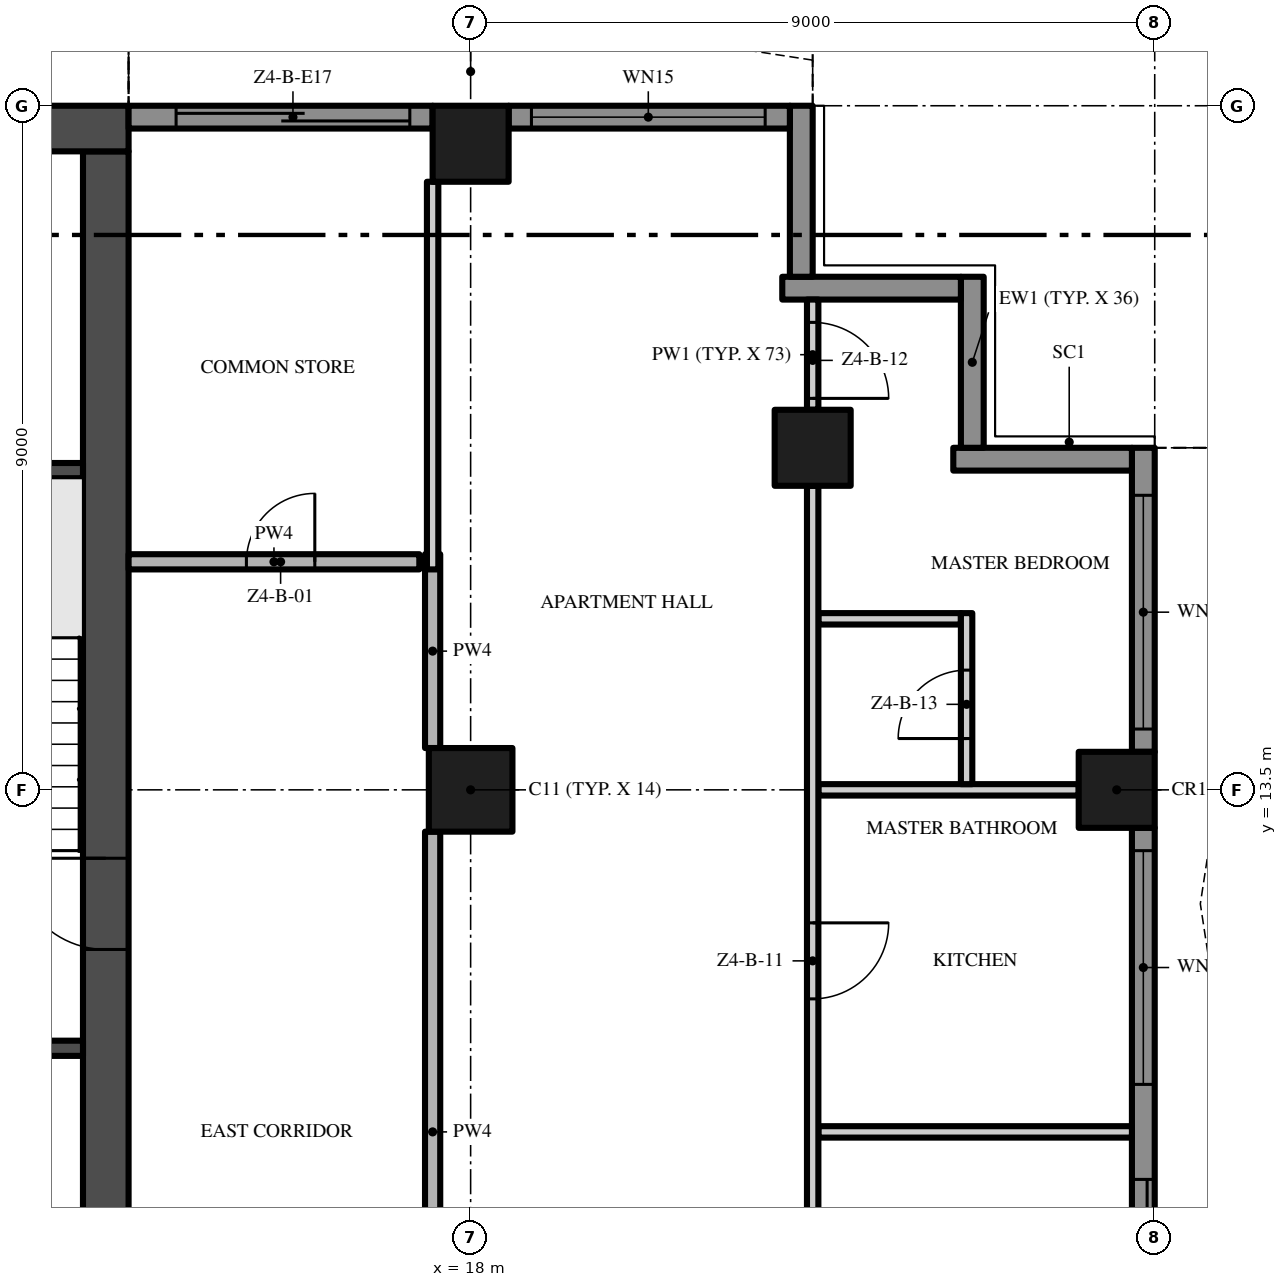
"""IFC4 building model, lengths in metres.
Left out: names, types, materials, properties, quantities, classifications, styles, units other than length and angle.
Written with IfcOpenShell. Run it as: python <this file> out.ifc"""

import sys

from ifc_helpers import new_model, si_unit, direction, frame, frame_2d, origin, origin_2d, place, context, subcontext, project, spatial, polyline, rectangle, outline, extrude, element, fill, save


model = new_model("IFC4")
c1 = context("Model", 3, precision=1e-05, world=origin(), true_north=direction((0.0, 1.0)))
c2 = subcontext(c1, "Body", "Model", "MODEL_VIEW")
j1 = project(units=[si_unit("LENGTHUNIT", "METRE"), si_unit("PLANEANGLEUNIT", "RADIAN")], contexts=[c1])
p1 = place(None, origin())
s1 = spatial("IfcSite", under=j1, at=p1, CompositionType="ELEMENT")
p2 = place(p1, origin())
s2 = spatial("IfcBuilding", under=s1, at=p2, CompositionType="ELEMENT")
p3 = place(p2, frame((0.0, 0.0, 203.4)))
s3 = spatial("IfcBuildingStorey", under=s2, at=p3, CompositionType="ELEMENT", Elevation=203.4)
p4 = place(p3, frame((13.2, 5.1, -0.3), z_axis=(0.0, 0.0, 1.0), x_axis=(0.0, 1.0, 0.0)))
e1 = element("IfcWall", 1, at=p4, inside=s3, PredefinedType="SHEAR", context=c2, shape_type="SweptSolid", body=[
    extrude(rectangle(XDim=16.8, YDim=0.6, at=frame_2d((8.4, 0.0))), origin(), (0.0, 0.0, 1.0), 3.8),
])
p5 = place(p4, frame((6.3, 0.0, 0.3)))
e2 = element("IfcOpeningElement", 2, at=p5, cuts=e1, PredefinedType="OPENING", context=c2, shape_type="SweptSolid", body=[
    extrude(rectangle(XDim=1.2, YDim=2.2, at=frame_2d((0.6, 1.1))), frame((0.0, 0.31, 0.0), z_axis=(0.0, -1.0, 0.0), x_axis=(1.0, 0.0, 0.0)), (0.0, 0.0, 1.0), 0.62),
])
p6 = place(p3, frame((13.5, 22.2, -0.3), z_axis=(0.0, 0.0, 1.0), x_axis=(-1.0, 0.0, 0.0)))
e3 = element("IfcWall", 3, at=p6, inside=s3, PredefinedType="SHEAR", context=c2, shape_type="SweptSolid", body=[
    extrude(rectangle(XDim=27.0, YDim=0.6, at=frame_2d((13.5, 0.0))), origin(), (0.0, 0.0, 1.0), 3.8),
])
p7 = place(p3, frame((18.0, 13.5, 0.0), z_axis=(0.0, 0.0, 1.0), x_axis=(1.0, 0.0, 0.0)))
e4 = element("IfcColumn", 4, at=p7, inside=s3, PredefinedType="COLUMN", context=c2, shape_type="SweptSolid", body=[
    extrude(rectangle(XDim=1.1, YDim=1.1, at=origin_2d()), origin(), (0.0, 0.0, 1.0), 3.5),
])
for number, where, z_axis, x_axis in (
    (5, (18.0, 22.0, 0.0), (0.0, 0.0, 1.0), (1.0, 0.0, 0.0)),
    (6, (26.5, 13.5, 0.0), (0.0, 0.0, 1.0), (1.0, 0.0, 0.0)),
    (7, (22.5, 18.0, 0.0), (0.0, 0.0, 1.0), (1.0, 0.0, 0.0)),
):
    element("IfcColumn", number, at=place(p3, frame(where, z_axis=z_axis, x_axis=x_axis)), inside=s3, PredefinedType="COLUMN", context=c2, shape_type="SweptSolid", body=[
        extrude(rectangle(XDim=1.0, YDim=1.0, at=origin_2d()), origin(), (0.0, 0.0, 1.0), 3.5),
    ])
p8 = place(p3, frame((26.85, 13.0, 0.0), z_axis=(0.0, 0.0, 1.0), x_axis=(0.0, -1.0, 0.0)))
e8 = element("IfcWall", 8, at=p8, inside=s3, PredefinedType="SOLIDWALL", context=c2, shape_type="SweptSolid", body=[
    extrude(rectangle(XDim=8.0, YDim=0.3, at=frame_2d((4.0, 0.0))), origin(), (0.0, 0.0, 1.0), 3.5),
])
p9 = place(p8, frame((4.625, 0.0, 0.0)))
e9 = element("IfcOpeningElement", 9, at=p9, cuts=e8, PredefinedType="OPENING", context=c2, shape_type="SweptSolid", body=[
    extrude(rectangle(XDim=3.075, YDim=2.4, at=frame_2d((1.538, 1.2))), frame((0.0, 0.16, 0.0), z_axis=(0.0, -1.0, 0.0), x_axis=(1.0, 0.0, 0.0)), (0.0, 0.0, 1.0), 0.32),
])
p10 = place(p8, frame((0.3, 0.0, 0.45)))
e10 = element("IfcOpeningElement", 10, at=p10, cuts=e8, PredefinedType="OPENING", context=c2, shape_type="SweptSolid", body=[
    extrude(rectangle(XDim=3.075, YDim=2.65, at=frame_2d((1.538, 1.325))), frame((0.0, 0.16, 0.0), z_axis=(0.0, -1.0, 0.0), x_axis=(1.0, 0.0, 0.0)), (0.0, 0.0, 1.0), 0.32),
])
p11 = place(p3, frame((26.85, 18.0, 0.0), z_axis=(0.0, 0.0, 1.0), x_axis=(0.0, -1.0, 0.0)))
e11 = element("IfcWall", 11, at=p11, inside=s3, PredefinedType="SOLIDWALL", context=c2, shape_type="SweptSolid", body=[
    extrude(rectangle(XDim=4.0, YDim=0.3, at=frame_2d((2.0, 0.0))), origin(), (0.0, 0.0, 1.0), 3.5),
])
p12 = place(p11, frame((0.625, 0.0, 0.45)))
e12 = element("IfcOpeningElement", 12, at=p12, cuts=e11, PredefinedType="OPENING", context=c2, shape_type="SweptSolid", body=[
    extrude(rectangle(XDim=3.075, YDim=2.65, at=frame_2d((1.538, 1.325))), frame((0.0, 0.16, 0.0), z_axis=(0.0, -1.0, 0.0), x_axis=(1.0, 0.0, 0.0)), (0.0, 0.0, 1.0), 0.32),
])
p13 = place(p3, frame((24.35, 17.85, 0.0), z_axis=(0.0, 0.0, 1.0), x_axis=(1.0, 0.0, 0.0)))
e13 = element("IfcWall", 13, at=p13, inside=s3, PredefinedType="SOLIDWALL", context=c2, shape_type="SweptSolid", body=[
    extrude(rectangle(XDim=2.35, YDim=0.3, at=frame_2d((1.175, 0.0))), origin(), (0.0, 0.0, 1.0), 3.5),
])
p14 = place(p3, frame((24.6, 20.25, 0.0), z_axis=(0.0, 0.0, 1.0), x_axis=(0.0, -1.0, 0.0)))
e14 = element("IfcWall", 14, at=p14, inside=s3, PredefinedType="SOLIDWALL", context=c2, shape_type="SweptSolid", body=[
    extrude(rectangle(XDim=2.25, YDim=0.3, at=frame_2d((1.125, 0.0))), origin(), (0.0, 0.0, 1.0), 3.5),
])
p15 = place(p3, frame((22.1, 20.1, 0.0), z_axis=(0.0, 0.0, 1.0), x_axis=(1.0, 0.0, 0.0)))
e15 = element("IfcWall", 15, at=p15, inside=s3, PredefinedType="SOLIDWALL", context=c2, shape_type="SweptSolid", body=[
    extrude(rectangle(XDim=2.35, YDim=0.3, at=frame_2d((1.175, 0.0))), origin(), (0.0, 0.0, 1.0), 3.5),
])
p16 = place(p3, frame((22.35, 22.5, 0.0), z_axis=(0.0, 0.0, 1.0), x_axis=(0.0, -1.0, 0.0)))
e16 = element("IfcWall", 16, at=p16, inside=s3, PredefinedType="SOLIDWALL", context=c2, shape_type="SweptSolid", body=[
    extrude(rectangle(XDim=2.25, YDim=0.3, at=frame_2d((1.125, 0.0))), origin(), (0.0, 0.0, 1.0), 3.5),
])
p17 = place(p3, frame((18.5, 22.35, 0.0), z_axis=(0.0, 0.0, 1.0), x_axis=(1.0, 0.0, 0.0)))
e17 = element("IfcWall", 17, at=p17, inside=s3, PredefinedType="SOLIDWALL", context=c2, shape_type="SweptSolid", body=[
    extrude(rectangle(XDim=3.7, YDim=0.3, at=frame_2d((1.85, 0.0))), origin(), (0.0, 0.0, 1.0), 3.5),
])
p18 = place(p17, frame((0.3, 0.0, 0.45)))
e18 = element("IfcOpeningElement", 18, at=p18, cuts=e17, PredefinedType="OPENING", context=c2, shape_type="SweptSolid", body=[
    extrude(rectangle(XDim=3.075, YDim=2.65, at=frame_2d((1.538, 1.325))), frame((0.0, 0.16, 0.0), z_axis=(0.0, -1.0, 0.0), x_axis=(1.0, 0.0, 0.0)), (0.0, 0.0, 1.0), 0.32),
])
p19 = place(p3, frame((13.5, 22.35, 0.0), z_axis=(0.0, 0.0, 1.0), x_axis=(1.0, 0.0, 0.0)))
e19 = element("IfcWall", 19, at=p19, inside=s3, PredefinedType="SOLIDWALL", context=c2, shape_type="SweptSolid", body=[
    extrude(rectangle(XDim=4.0, YDim=0.3, at=frame_2d((2.0, 0.0))), origin(), (0.0, 0.0, 1.0), 3.5),
])
p20 = place(p19, frame((0.625, 0.0, 0.0)))
e20 = element("IfcOpeningElement", 20, at=p20, cuts=e19, PredefinedType="OPENING", context=c2, shape_type="SweptSolid", body=[
    extrude(rectangle(XDim=3.075, YDim=2.4, at=frame_2d((1.538, 1.2))), frame((0.0, 0.16, 0.0), z_axis=(0.0, -1.0, 0.0), x_axis=(1.0, 0.0, 0.0)), (0.0, 0.0, 1.0), 0.32),
])
p21 = place(p3, origin())
e21 = element("IfcWall", 21, at=p21, inside=s3, PredefinedType="USERDEFINED", context=c2, shape_type="SweptSolid", body=[
    extrude(outline(polyline([(27.6, -18.0), (27.829, -16.5), (28.429, -15.0), (29.171, -13.5), (29.771, -12.0), (30.0, -10.5), (29.771, -9.0), (29.171, -7.5), (28.429, -6.0), (27.829, -4.5), (27.6, -3.0), (27.829, -1.5), (28.429, 0.0), (29.171, 1.5), (29.771, 3.0), (30.0, 4.5), (29.771, 6.0), (29.171, 7.5), (28.429, 9.0), (27.829, 10.5), (27.6, 12.0), (27.829, 13.5), (28.429, 15.0), (29.171, 16.5), (29.771, 18.0), (29.539, 18.093), (28.942, 16.602), (28.201, 15.102), (27.586, 13.566), (27.347, 12.0), (27.586, 10.434), (28.201, 8.898), (28.942, 7.398), (29.528, 5.934), (29.747, 4.5), (29.528, 3.066), (28.942, 1.602), (28.201, 0.102), (27.586, -1.434), (27.347, -3.0), (27.586, -4.566), (28.201, -6.102), (28.942, -7.602), (29.528, -9.066), (29.747, -10.5), (29.528, -11.934), (28.942, -13.398), (28.201, -14.898), (27.586, -16.434), (27.353, -17.962), (27.6, -18.0)])), origin(), (0.0, 0.0, 1.0), 0.9),
])
p22 = place(p3, origin())
e22 = element("IfcWall", 22, at=p22, inside=s3, PredefinedType="USERDEFINED", context=c2, shape_type="SweptSolid", body=[
    extrude(outline(polyline([(22.5, 23.1), (21.0, 23.329), (19.5, 23.929), (18.0, 24.671), (16.5, 25.271), (15.0, 25.5), (13.5, 25.271), (13.538, 25.024), (15.0, 25.247), (16.434, 25.028), (17.898, 24.442), (19.398, 23.701), (20.934, 23.086), (22.462, 22.853), (22.5, 23.1)])), origin(), (0.0, 0.0, 1.0), 0.9),
])
for number, where, z_axis, x_axis in (
    (23, (9.65, 10.1, 0.0), (0.0, 0.0, 1.0), (1.0, 0.0, 0.0)),
    (24, (9.65, 17.7, 0.0), (0.0, 0.0, 1.0), (1.0, 0.0, 0.0)),
):
    element("IfcWall", number, at=place(p3, frame(where, z_axis=z_axis, x_axis=x_axis)), inside=s3, PredefinedType="SHEAR", context=c2, shape_type="SweptSolid", body=[
        extrude(rectangle(XDim=3.25, YDim=0.2, at=frame_2d((1.625, 0.0))), origin(), (0.0, 0.0, 1.0), 3.5),
    ])
p23 = place(p3, frame((22.575, 9.0, 0.0), z_axis=(0.0, 0.0, 1.0), x_axis=(1.0, 0.0, 0.0)))
e25 = element("IfcWall", 25, at=p23, inside=s3, PredefinedType="PARTITIONING", context=c2, shape_type="SweptSolid", body=[
    extrude(rectangle(XDim=4.125, YDim=0.15, at=frame_2d((2.062, 0.0))), origin(), (0.0, 0.0, 1.0), 3.5),
])
p24 = place(p3, frame((22.575, 13.5, 0.0), z_axis=(0.0, 0.0, 1.0), x_axis=(1.0, 0.0, 0.0)))
e26 = element("IfcWall", 26, at=p24, inside=s3, PredefinedType="PARTITIONING", context=c2, shape_type="SweptSolid", body=[
    extrude(rectangle(XDim=3.425, YDim=0.15, at=frame_2d((1.712, 0.0))), origin(), (0.0, 0.0, 1.0), 3.5),
])
p25 = place(p3, frame((22.575, 15.75, 0.0), z_axis=(0.0, 0.0, 1.0), x_axis=(1.0, 0.0, 0.0)))
e27 = element("IfcWall", 27, at=p25, inside=s3, PredefinedType="PARTITIONING", context=c2, shape_type="SweptSolid", body=[
    extrude(rectangle(XDim=1.875, YDim=0.15, at=frame_2d((0.938, 0.0))), origin(), (0.0, 0.0, 1.0), 3.5),
])
p26 = place(p3, frame((13.5, 16.5, 0.0), z_axis=(0.0, 0.0, 1.0), x_axis=(1.0, 0.0, 0.0)))
e28 = element("IfcWall", 28, at=p26, inside=s3, PredefinedType="PARTITIONING", context=c2, shape_type="SweptSolid", body=[
    extrude(rectangle(XDim=3.825, YDim=0.2, at=frame_2d((1.913, 0.0))), origin(), (0.0, 0.0, 1.0), 3.5),
])
p27 = place(p26, frame((1.55, 0.0, 0.0)))
e29 = element("IfcOpeningElement", 29, at=p27, cuts=e28, PredefinedType="OPENING", context=c2, shape_type="SweptSolid", body=[
    extrude(rectangle(XDim=0.9, YDim=2.1, at=frame_2d((0.45, 1.05))), frame((0.0, 0.11, 0.0), z_axis=(0.0, -1.0, 0.0), x_axis=(1.0, 0.0, 0.0)), (0.0, 0.0, 1.0), 0.22),
])
p28 = place(p3, frame((17.5, 12.95, 0.0), z_axis=(0.0, 0.0, 1.0), x_axis=(0.0, -1.0, 0.0)))
e30 = element("IfcWall", 30, at=p28, inside=s3, PredefinedType="PARTITIONING", context=c2, shape_type="SweptSolid", body=[
    extrude(rectangle(XDim=7.9, YDim=0.2, at=frame_2d((3.95, 0.0))), origin(), (0.0, 0.0, 1.0), 3.5),
])
p29 = place(p28, frame((5.6, 0.0, 0.0)))
e31 = element("IfcOpeningElement", 31, at=p29, cuts=e30, PredefinedType="OPENING", context=c2, shape_type="SweptSolid", body=[
    extrude(rectangle(XDim=1.2, YDim=2.4, at=frame_2d((0.6, 1.2))), frame((0.0, 0.11, 0.0), z_axis=(0.0, -1.0, 0.0), x_axis=(1.0, 0.0, 0.0)), (0.0, 0.0, 1.0), 0.22),
])
p30 = place(p3, frame((17.5, 14.05, 0.0), z_axis=(0.0, 0.0, 1.0), x_axis=(0.0, 1.0, 0.0)))
e32 = element("IfcWall", 32, at=p30, inside=s3, PredefinedType="PARTITIONING", context=c2, shape_type="SweptSolid", body=[
    extrude(rectangle(XDim=2.55, YDim=0.2, at=frame_2d((1.275, 0.0))), origin(), (0.0, 0.0, 1.0), 3.5),
])
p31 = place(p3, frame((17.5, 16.4, 0.0), z_axis=(0.0, 0.0, 1.0), x_axis=(0.0, 1.0, 0.0)))
e33 = element("IfcWall", 33, at=p31, inside=s3, PredefinedType="PARTITIONING", context=c2, shape_type="SweptSolid", body=[
    extrude(rectangle(XDim=5.1, YDim=0.15, at=frame_2d((2.55, 0.0))), origin(), (0.0, 0.0, 1.0), 3.5),
])
p32 = place(p3, frame((22.5, 17.5, 0.0), z_axis=(0.0, 0.0, 1.0), x_axis=(0.0, -1.0, 0.0)))
e34 = element("IfcWall", 34, at=p32, inside=s3, PredefinedType="PARTITIONING", context=c2, shape_type="SweptSolid", body=[
    extrude(rectangle(XDim=17.4, YDim=0.15, at=frame_2d((8.7, 0.0))), origin(), (0.0, 0.0, 1.0), 3.5),
])
p33 = place(p32, frame((13.2, 0.0, 0.0)))
e35 = element("IfcOpeningElement", 35, at=p33, cuts=e34, PredefinedType="OPENING", context=c2, shape_type="SweptSolid", body=[
    extrude(rectangle(XDim=1.8, YDim=2.4, at=frame_2d((0.9, 1.2))), frame((0.0, 0.085, 0.0), z_axis=(0.0, -1.0, 0.0), x_axis=(1.0, 0.0, 0.0)), (0.0, 0.0, 1.0), 0.17),
])
p34 = place(p32, frame((5.75, 0.0, 0.0)))
e36 = element("IfcOpeningElement", 36, at=p34, cuts=e34, PredefinedType="OPENING", context=c2, shape_type="SweptSolid", body=[
    extrude(rectangle(XDim=1.0, YDim=2.4, at=frame_2d((0.5, 1.2))), frame((0.0, 0.085, 0.0), z_axis=(0.0, -1.0, 0.0), x_axis=(1.0, 0.0, 0.0)), (0.0, 0.0, 1.0), 0.17),
])
p35 = place(p3, frame((22.5, 19.95, 0.0), z_axis=(0.0, 0.0, 1.0), x_axis=(0.0, -1.0, 0.0)))
e37 = element("IfcWall", 37, at=p35, inside=s3, PredefinedType="PARTITIONING", context=c2, shape_type="SweptSolid", body=[
    extrude(rectangle(XDim=1.45, YDim=0.15, at=frame_2d((0.725, 0.0))), origin(), (0.0, 0.0, 1.0), 3.5),
])
p36 = place(p35, frame((0.3, 0.0, 0.0)))
e38 = element("IfcOpeningElement", 38, at=p36, cuts=e37, PredefinedType="OPENING", context=c2, shape_type="SweptSolid", body=[
    extrude(rectangle(XDim=1.0, YDim=2.4, at=frame_2d((0.5, 1.2))), frame((0.0, 0.085, 0.0), z_axis=(0.0, -1.0, 0.0), x_axis=(1.0, 0.0, 0.0)), (0.0, 0.0, 1.0), 0.17),
])
p37 = place(p3, frame((24.525, 13.575, 0.0), z_axis=(0.0, 0.0, 1.0), x_axis=(0.0, 1.0, 0.0)))
e39 = element("IfcWall", 39, at=p37, inside=s3, PredefinedType="PARTITIONING", context=c2, shape_type="SweptSolid", body=[
    extrude(rectangle(XDim=2.25, YDim=0.15, at=frame_2d((1.125, 0.0))), origin(), (0.0, 0.0, 1.0), 3.5),
])
p38 = place(p37, frame((0.6, 0.0, 0.0)))
e40 = element("IfcOpeningElement", 40, at=p38, cuts=e39, PredefinedType="OPENING", context=c2, shape_type="SweptSolid", body=[
    extrude(rectangle(XDim=0.9, YDim=2.1, at=frame_2d((0.45, 1.05))), frame((0.0, 0.085, 0.0), z_axis=(0.0, -1.0, 0.0), x_axis=(1.0, 0.0, 0.0)), (0.0, 0.0, 1.0), 0.17),
])
p39 = place(p9, origin())
e41 = element("IfcDoor", 41, at=p39, inside=s3, OperationType="SINGLE_SWING_LEFT", PredefinedType="DOOR", context=c2, shape_type="SweptSolid", body=[
    extrude(rectangle(XDim=3.075, YDim=2.4, at=frame_2d((1.538, 1.2))), frame((0.0, 0.025, 0.0), z_axis=(0.0, -1.0, 0.0), x_axis=(1.0, 0.0, 0.0)), (0.0, 0.0, 1.0), 0.05),
])
fill(e9, e41)
p40 = place(p10, origin())
e42 = element("IfcWindow", 42, at=p40, inside=s3, PartitioningType="SINGLE_PANEL", PredefinedType="WINDOW", context=c2, shape_type="SweptSolid", body=[
    extrude(rectangle(XDim=3.075, YDim=2.65, at=frame_2d((1.538, 1.325))), frame((0.0, 0.03, 0.0), z_axis=(0.0, -1.0, 0.0), x_axis=(1.0, 0.0, 0.0)), (0.0, 0.0, 1.0), 0.06),
])
fill(e10, e42)
p41 = place(p12, origin())
e43 = element("IfcWindow", 43, at=p41, inside=s3, PartitioningType="SINGLE_PANEL", PredefinedType="WINDOW", context=c2, shape_type="SweptSolid", body=[
    extrude(rectangle(XDim=3.075, YDim=2.65, at=frame_2d((1.538, 1.325))), frame((0.0, 0.03, 0.0), z_axis=(0.0, -1.0, 0.0), x_axis=(1.0, 0.0, 0.0)), (0.0, 0.0, 1.0), 0.06),
])
fill(e12, e43)
p42 = place(p18, origin())
e44 = element("IfcWindow", 44, at=p42, inside=s3, PartitioningType="SINGLE_PANEL", PredefinedType="WINDOW", context=c2, shape_type="SweptSolid", body=[
    extrude(rectangle(XDim=3.075, YDim=2.65, at=frame_2d((1.538, 1.325))), frame((0.0, 0.03, 0.0), z_axis=(0.0, -1.0, 0.0), x_axis=(1.0, 0.0, 0.0)), (0.0, 0.0, 1.0), 0.06),
])
fill(e18, e44)
p43 = place(p20, origin())
e45 = element("IfcDoor", 45, at=p43, inside=s3, OperationType="SINGLE_SWING_LEFT", PredefinedType="DOOR", context=c2, shape_type="SweptSolid", body=[
    extrude(rectangle(XDim=3.075, YDim=2.4, at=frame_2d((1.538, 1.2))), frame((0.0, 0.025, 0.0), z_axis=(0.0, -1.0, 0.0), x_axis=(1.0, 0.0, 0.0)), (0.0, 0.0, 1.0), 0.05),
])
fill(e20, e45)
p44 = place(p5, frame((1.2, 0.0, 0.0), z_axis=(0.0, 0.0, 1.0), x_axis=(-1.0, 0.0, 0.0)))
e46 = element("IfcDoor", 46, at=p44, inside=s3, OperationType="SINGLE_SWING_LEFT", PredefinedType="DOOR", context=c2, shape_type="SweptSolid", body=[
    extrude(rectangle(XDim=1.2, YDim=2.2, at=frame_2d((0.6, 1.1))), frame((0.0, 0.025, 0.0), z_axis=(0.0, -1.0, 0.0), x_axis=(1.0, 0.0, 0.0)), (0.0, 0.0, 1.0), 0.05),
])
fill(e2, e46)
p45 = place(p27, origin())
e47 = element("IfcDoor", 47, at=p45, inside=s3, OperationType="SINGLE_SWING_RIGHT", PredefinedType="DOOR", context=c2, shape_type="SweptSolid", body=[
    extrude(rectangle(XDim=0.9, YDim=2.1, at=frame_2d((0.45, 1.05))), frame((0.0, 0.025, 0.0), z_axis=(0.0, -1.0, 0.0), x_axis=(1.0, 0.0, 0.0)), (0.0, 0.0, 1.0), 0.05),
])
fill(e29, e47)
p46 = place(p34, origin())
e48 = element("IfcDoor", 48, at=p46, inside=s3, OperationType="SINGLE_SWING_LEFT", PredefinedType="DOOR", context=c2, shape_type="SweptSolid", body=[
    extrude(rectangle(XDim=1.0, YDim=2.4, at=frame_2d((0.5, 1.2))), frame((0.0, 0.025, 0.0), z_axis=(0.0, -1.0, 0.0), x_axis=(1.0, 0.0, 0.0)), (0.0, 0.0, 1.0), 0.05),
])
fill(e36, e48)
p47 = place(p36, origin())
e49 = element("IfcDoor", 49, at=p47, inside=s3, OperationType="SINGLE_SWING_RIGHT", PredefinedType="DOOR", context=c2, shape_type="SweptSolid", body=[
    extrude(rectangle(XDim=1.0, YDim=2.4, at=frame_2d((0.5, 1.2))), frame((0.0, 0.025, 0.0), z_axis=(0.0, -1.0, 0.0), x_axis=(1.0, 0.0, 0.0)), (0.0, 0.0, 1.0), 0.05),
])
fill(e38, e49)
p48 = place(p38, origin())
e50 = element("IfcDoor", 50, at=p48, inside=s3, OperationType="SINGLE_SWING_LEFT", PredefinedType="DOOR", context=c2, shape_type="SweptSolid", body=[
    extrude(rectangle(XDim=0.9, YDim=2.1, at=frame_2d((0.45, 1.05))), frame((0.0, 0.025, 0.0), z_axis=(0.0, -1.0, 0.0), x_axis=(1.0, 0.0, 0.0)), (0.0, 0.0, 1.0), 0.05),
])
fill(e40, e50)
save(model, sys.argv[1])
